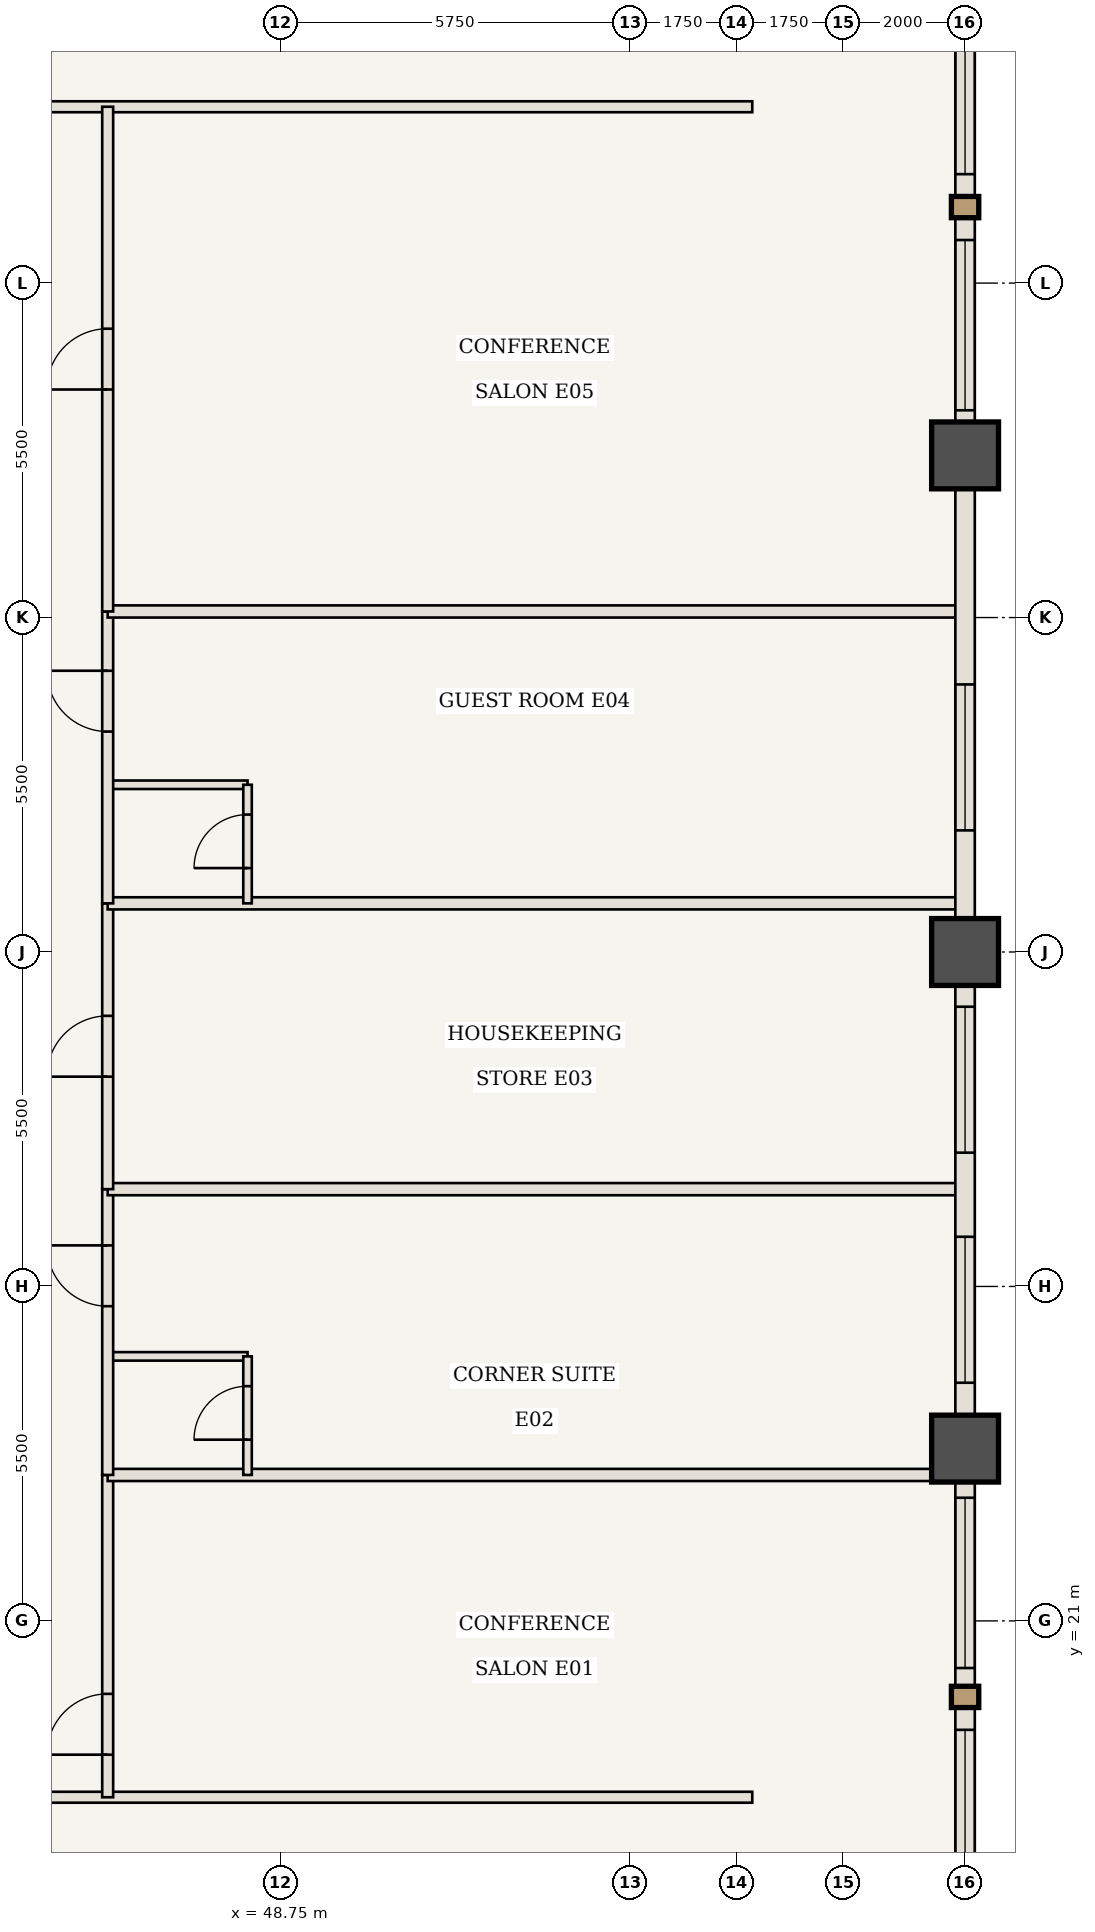
"""IFC4 building model, lengths in metres.
Left out: names, types, materials, properties, quantities, classifications, styles, units other than length and angle.
Written with IfcOpenShell. Run it as: python <this file> out.ifc"""

import sys

from ifc_helpers import new_model, si_unit, direction, frame, frame_2d, origin, origin_2d, place, context, subcontext, project, spatial, rectangle, extrude, element, fill, save


model = new_model("IFC4")
c1 = context("Model", 3, precision=1e-05, world=origin(), true_north=direction((0.0, 1.0)))
c2 = subcontext(c1, "Body", "Model", "MODEL_VIEW")
j1 = project(units=[si_unit("LENGTHUNIT", "METRE"), si_unit("PLANEANGLEUNIT", "RADIAN")], contexts=[c1])
p1 = place(None, origin())
s1 = spatial("IfcSite", under=j1, at=p1, CompositionType="ELEMENT")
p2 = place(p1, origin())
s2 = spatial("IfcBuilding", under=s1, at=p2, CompositionType="ELEMENT")
p3 = place(p2, frame((0.0, 0.0, 56.35)))
s3 = spatial("IfcBuildingStorey", under=s2, at=p3, CompositionType="ELEMENT", Elevation=56.35)
for number, where, z_axis, x_axis in (
    (1, (60.0, 23.833, 0.0), (0.0, 0.0, 1.0), (1.0, 0.0, 0.0)),
    (2, (60.0, 32.0, 0.0), (0.0, 0.0, 1.0), (1.0, 0.0, 0.0)),
    (3, (60.0, 40.167, 0.0), (0.0, 0.0, 1.0), (1.0, 0.0, 0.0)),
):
    element("IfcColumn", number, at=place(p3, frame(where, z_axis=z_axis, x_axis=x_axis)), inside=s3, PredefinedType="COLUMN", context=c2, shape_type="SweptSolid", body=[
        extrude(rectangle(XDim=1.1, YDim=1.1, at=origin_2d()), origin(), (0.0, 0.0, 1.0), 3.5),
    ])
p4 = place(p3, frame((34.5, 18.1, 0.0), z_axis=(0.0, 0.0, 1.0), x_axis=(1.0, 0.0, 0.0)))
e4 = element("IfcWall", 4, at=p4, inside=s3, PredefinedType="STANDARD", context=c2, shape_type="SweptSolid", body=[
    extrude(rectangle(XDim=22.0, YDim=0.18, at=frame_2d((11.0, 0.0))), origin(), (0.0, 0.0, 1.0), 3.32),
])
p5 = place(p4, frame((5.175, 0.0, 0.0)))
e5 = element("IfcOpeningElement", 5, at=p5, cuts=e4, PredefinedType="OPENING", context=c2, shape_type="SweptSolid", body=[
    extrude(rectangle(XDim=1.0, YDim=2.15, at=frame_2d((0.5, 1.075))), frame((0.0, 0.1, 0.0), z_axis=(0.0, -1.0, 0.0), x_axis=(1.0, 0.0, 0.0)), (0.0, 0.0, 1.0), 0.2),
])
p6 = place(p3, frame((38.0, 45.9, 0.0), z_axis=(0.0, 0.0, 1.0), x_axis=(1.0, 0.0, 0.0)))
e6 = element("IfcWall", 6, at=p6, inside=s3, PredefinedType="STANDARD", context=c2, shape_type="SweptSolid", body=[
    extrude(rectangle(XDim=18.5, YDim=0.18, at=frame_2d((9.25, 0.0))), origin(), (0.0, 0.0, 1.0), 3.32),
])
p7 = place(p6, frame((4.875, 0.0, 0.0)))
e7 = element("IfcOpeningElement", 7, at=p7, cuts=e6, PredefinedType="OPENING", context=c2, shape_type="SweptSolid", body=[
    extrude(rectangle(XDim=1.0, YDim=2.15, at=frame_2d((0.5, 1.075))), frame((0.0, 0.1, 0.0), z_axis=(0.0, -1.0, 0.0), x_axis=(1.0, 0.0, 0.0)), (0.0, 0.0, 1.0), 0.2),
])
p8 = place(p3, frame((45.9, 18.1, 0.0), z_axis=(0.0, 0.0, 1.0), x_axis=(0.0, 1.0, 0.0)))
e8 = element("IfcWall", 8, at=p8, inside=s3, PredefinedType="STANDARD", context=c2, shape_type="SweptSolid", body=[
    extrude(rectangle(XDim=5.3, YDim=0.18, at=frame_2d((2.65, 0.0))), origin(), (0.0, 0.0, 1.0), 3.32),
])
p9 = place(p8, frame((0.7, 0.0, 0.0)))
e9 = element("IfcOpeningElement", 9, at=p9, cuts=e8, PredefinedType="OPENING", context=c2, shape_type="SweptSolid", body=[
    extrude(rectangle(XDim=1.0, YDim=2.15, at=frame_2d((0.5, 1.075))), frame((0.0, 0.1, 0.0), z_axis=(0.0, -1.0, 0.0), x_axis=(1.0, 0.0, 0.0)), (0.0, 0.0, 1.0), 0.2),
])
p10 = place(p3, frame((45.9, 23.4, 0.0), z_axis=(0.0, 0.0, 1.0), x_axis=(1.0, 0.0, 0.0)))
e10 = element("IfcWall", 10, at=p10, inside=s3, PredefinedType="STANDARD", context=c2, shape_type="SweptSolid", body=[
    extrude(rectangle(XDim=14.04, YDim=0.2, at=frame_2d((7.02, 0.0))), origin(), (0.0, 0.0, 1.0), 3.32),
])
p11 = place(p3, frame((45.9, 25.35, 0.0), z_axis=(0.0, 0.0, 1.0), x_axis=(1.0, 0.0, 0.0)))
e11 = element("IfcWall", 11, at=p11, inside=s3, PredefinedType="STANDARD", context=c2, shape_type="SweptSolid", body=[
    extrude(rectangle(XDim=2.3, YDim=0.14, at=frame_2d((1.15, 0.0))), origin(), (0.0, 0.0, 1.0), 3.32),
])
p12 = place(p3, frame((48.2, 23.4, 0.0), z_axis=(0.0, 0.0, 1.0), x_axis=(0.0, 1.0, 0.0)))
e12 = element("IfcWall", 12, at=p12, inside=s3, PredefinedType="STANDARD", context=c2, shape_type="SweptSolid", body=[
    extrude(rectangle(XDim=1.95, YDim=0.14, at=frame_2d((0.975, 0.0))), origin(), (0.0, 0.0, 1.0), 3.32),
])
p13 = place(p12, frame((0.58, 0.0, 0.0)))
e13 = element("IfcOpeningElement", 13, at=p13, cuts=e12, PredefinedType="OPENING", context=c2, shape_type="SweptSolid", body=[
    extrude(rectangle(XDim=0.88, YDim=2.1, at=frame_2d((0.44, 1.05))), frame((0.0, 0.08, 0.0), z_axis=(0.0, -1.0, 0.0), x_axis=(1.0, 0.0, 0.0)), (0.0, 0.0, 1.0), 0.16),
])
p14 = place(p3, frame((45.9, 23.4, 0.0), z_axis=(0.0, 0.0, 1.0), x_axis=(0.0, 1.0, 0.0)))
e14 = element("IfcWall", 14, at=p14, inside=s3, PredefinedType="STANDARD", context=c2, shape_type="SweptSolid", body=[
    extrude(rectangle(XDim=4.7, YDim=0.18, at=frame_2d((2.35, 0.0))), origin(), (0.0, 0.0, 1.0), 3.32),
])
p15 = place(p14, frame((2.775, 0.0, 0.0)))
e15 = element("IfcOpeningElement", 15, at=p15, cuts=e14, PredefinedType="OPENING", context=c2, shape_type="SweptSolid", body=[
    extrude(rectangle(XDim=1.0, YDim=2.15, at=frame_2d((0.5, 1.075))), frame((0.0, 0.1, 0.0), z_axis=(0.0, -1.0, 0.0), x_axis=(1.0, 0.0, 0.0)), (0.0, 0.0, 1.0), 0.2),
])
p16 = place(p3, frame((45.9, 28.1, 0.0), z_axis=(0.0, 0.0, 1.0), x_axis=(1.0, 0.0, 0.0)))
e16 = element("IfcWall", 16, at=p16, inside=s3, PredefinedType="STANDARD", context=c2, shape_type="SweptSolid", body=[
    extrude(rectangle(XDim=14.04, YDim=0.2, at=frame_2d((7.02, 0.0))), origin(), (0.0, 0.0, 1.0), 3.32),
])
p17 = place(p3, frame((45.9, 28.1, 0.0), z_axis=(0.0, 0.0, 1.0), x_axis=(0.0, 1.0, 0.0)))
e17 = element("IfcWall", 17, at=p17, inside=s3, PredefinedType="STANDARD", context=c2, shape_type="SweptSolid", body=[
    extrude(rectangle(XDim=4.7, YDim=0.18, at=frame_2d((2.35, 0.0))), origin(), (0.0, 0.0, 1.0), 3.32),
])
p18 = place(p17, frame((1.85, 0.0, 0.0)))
e18 = element("IfcOpeningElement", 18, at=p18, cuts=e17, PredefinedType="OPENING", context=c2, shape_type="SweptSolid", body=[
    extrude(rectangle(XDim=1.0, YDim=2.15, at=frame_2d((0.5, 1.075))), frame((0.0, 0.1, 0.0), z_axis=(0.0, -1.0, 0.0), x_axis=(1.0, 0.0, 0.0)), (0.0, 0.0, 1.0), 0.2),
])
p19 = place(p3, frame((45.9, 32.8, 0.0), z_axis=(0.0, 0.0, 1.0), x_axis=(1.0, 0.0, 0.0)))
e19 = element("IfcWall", 19, at=p19, inside=s3, PredefinedType="STANDARD", context=c2, shape_type="SweptSolid", body=[
    extrude(rectangle(XDim=14.04, YDim=0.2, at=frame_2d((7.02, 0.0))), origin(), (0.0, 0.0, 1.0), 3.32),
])
p20 = place(p3, frame((45.9, 34.75, 0.0), z_axis=(0.0, 0.0, 1.0), x_axis=(1.0, 0.0, 0.0)))
e20 = element("IfcWall", 20, at=p20, inside=s3, PredefinedType="STANDARD", context=c2, shape_type="SweptSolid", body=[
    extrude(rectangle(XDim=2.3, YDim=0.14, at=frame_2d((1.15, 0.0))), origin(), (0.0, 0.0, 1.0), 3.32),
])
p21 = place(p3, frame((48.2, 32.8, 0.0), z_axis=(0.0, 0.0, 1.0), x_axis=(0.0, 1.0, 0.0)))
e21 = element("IfcWall", 21, at=p21, inside=s3, PredefinedType="STANDARD", context=c2, shape_type="SweptSolid", body=[
    extrude(rectangle(XDim=1.95, YDim=0.14, at=frame_2d((0.975, 0.0))), origin(), (0.0, 0.0, 1.0), 3.32),
])
p22 = place(p21, frame((0.58, 0.0, 0.0)))
e22 = element("IfcOpeningElement", 22, at=p22, cuts=e21, PredefinedType="OPENING", context=c2, shape_type="SweptSolid", body=[
    extrude(rectangle(XDim=0.88, YDim=2.1, at=frame_2d((0.44, 1.05))), frame((0.0, 0.08, 0.0), z_axis=(0.0, -1.0, 0.0), x_axis=(1.0, 0.0, 0.0)), (0.0, 0.0, 1.0), 0.16),
])
p23 = place(p3, frame((45.9, 32.8, 0.0), z_axis=(0.0, 0.0, 1.0), x_axis=(0.0, 1.0, 0.0)))
e23 = element("IfcWall", 23, at=p23, inside=s3, PredefinedType="STANDARD", context=c2, shape_type="SweptSolid", body=[
    extrude(rectangle(XDim=4.8, YDim=0.18, at=frame_2d((2.4, 0.0))), origin(), (0.0, 0.0, 1.0), 3.32),
])
p24 = place(p23, frame((2.825, 0.0, 0.0)))
e24 = element("IfcOpeningElement", 24, at=p24, cuts=e23, PredefinedType="OPENING", context=c2, shape_type="SweptSolid", body=[
    extrude(rectangle(XDim=1.0, YDim=2.15, at=frame_2d((0.5, 1.075))), frame((0.0, 0.1, 0.0), z_axis=(0.0, -1.0, 0.0), x_axis=(1.0, 0.0, 0.0)), (0.0, 0.0, 1.0), 0.2),
])
p25 = place(p3, frame((45.9, 37.6, 0.0), z_axis=(0.0, 0.0, 1.0), x_axis=(1.0, 0.0, 0.0)))
e25 = element("IfcWall", 25, at=p25, inside=s3, PredefinedType="STANDARD", context=c2, shape_type="SweptSolid", body=[
    extrude(rectangle(XDim=14.04, YDim=0.2, at=frame_2d((7.02, 0.0))), origin(), (0.0, 0.0, 1.0), 3.32),
])
p26 = place(p3, frame((45.9, 37.6, 0.0), z_axis=(0.0, 0.0, 1.0), x_axis=(0.0, 1.0, 0.0)))
e26 = element("IfcWall", 26, at=p26, inside=s3, PredefinedType="STANDARD", context=c2, shape_type="SweptSolid", body=[
    extrude(rectangle(XDim=8.3, YDim=0.18, at=frame_2d((4.15, 0.0))), origin(), (0.0, 0.0, 1.0), 3.32),
])
p27 = place(p26, frame((3.65, 0.0, 0.0)))
e27 = element("IfcOpeningElement", 27, at=p27, cuts=e26, PredefinedType="OPENING", context=c2, shape_type="SweptSolid", body=[
    extrude(rectangle(XDim=1.0, YDim=2.15, at=frame_2d((0.5, 1.075))), frame((0.0, 0.1, 0.0), z_axis=(0.0, -1.0, 0.0), x_axis=(1.0, 0.0, 0.0)), (0.0, 0.0, 1.0), 0.2),
])
p28 = place(p3, frame((60.0, 23.833, 0.0), z_axis=(0.0, 0.0, 1.0), x_axis=(0.0, -1.0, 0.0)))
e28 = element("IfcWall", 28, at=p28, inside=s3, PredefinedType="USERDEFINED", context=c2, shape_type="SweptSolid", body=[
    extrude(rectangle(XDim=8.167, YDim=0.32, at=frame_2d((4.083, 0.0))), origin(), (0.0, 0.0, 1.0), 2.52),
])
p29 = place(p28, frame((0.808, 0.0, 0.85)))
e29 = element("IfcOpeningElement", 29, at=p29, cuts=e28, PredefinedType="OPENING", context=c2, shape_type="SweptSolid", body=[
    extrude(rectangle(XDim=2.8, YDim=1.47, at=frame_2d((1.4, 0.735))), frame((0.0, 0.17, 0.0), z_axis=(0.0, -1.0, 0.0), x_axis=(1.0, 0.0, 0.0)), (0.0, 0.0, 1.0), 0.34),
])
p30 = place(p28, frame((4.625, 0.0, 0.85)))
e30 = element("IfcOpeningElement", 30, at=p30, cuts=e28, PredefinedType="OPENING", context=c2, shape_type="SweptSolid", body=[
    extrude(rectangle(XDim=2.8, YDim=1.47, at=frame_2d((1.4, 0.735))), frame((0.0, 0.17, 0.0), z_axis=(0.0, -1.0, 0.0), x_axis=(1.0, 0.0, 0.0)), (0.0, 0.0, 1.0), 0.34),
])
p31 = place(p3, frame((60.0, 32.0, 0.0), z_axis=(0.0, 0.0, 1.0), x_axis=(0.0, -1.0, 0.0)))
e31 = element("IfcWall", 31, at=p31, inside=s3, PredefinedType="USERDEFINED", context=c2, shape_type="SweptSolid", body=[
    extrude(rectangle(XDim=8.167, YDim=0.32, at=frame_2d((4.083, 0.0))), origin(), (0.0, 0.0, 1.0), 2.52),
])
p32 = place(p31, frame((0.9, 0.0, 0.85)))
e32 = element("IfcOpeningElement", 32, at=p32, cuts=e31, PredefinedType="OPENING", context=c2, shape_type="SweptSolid", body=[
    extrude(rectangle(XDim=2.4, YDim=1.47, at=frame_2d((1.2, 0.735))), frame((0.0, 0.17, 0.0), z_axis=(0.0, -1.0, 0.0), x_axis=(1.0, 0.0, 0.0)), (0.0, 0.0, 1.0), 0.34),
])
p33 = place(p31, frame((4.683, 0.0, 0.85)))
e33 = element("IfcOpeningElement", 33, at=p33, cuts=e31, PredefinedType="OPENING", context=c2, shape_type="SweptSolid", body=[
    extrude(rectangle(XDim=2.4, YDim=1.47, at=frame_2d((1.2, 0.735))), frame((0.0, 0.17, 0.0), z_axis=(0.0, -1.0, 0.0), x_axis=(1.0, 0.0, 0.0)), (0.0, 0.0, 1.0), 0.34),
])
p34 = place(p3, frame((60.0, 40.167, 0.0), z_axis=(0.0, 0.0, 1.0), x_axis=(0.0, -1.0, 0.0)))
e34 = element("IfcWall", 34, at=p34, inside=s3, PredefinedType="USERDEFINED", context=c2, shape_type="SweptSolid", body=[
    extrude(rectangle(XDim=8.167, YDim=0.32, at=frame_2d((4.083, 0.0))), origin(), (0.0, 0.0, 1.0), 2.52),
])
p35 = place(p34, frame((3.767, 0.0, 0.85)))
e35 = element("IfcOpeningElement", 35, at=p35, cuts=e34, PredefinedType="OPENING", context=c2, shape_type="SweptSolid", body=[
    extrude(rectangle(XDim=2.4, YDim=1.47, at=frame_2d((1.2, 0.735))), frame((0.0, 0.17, 0.0), z_axis=(0.0, -1.0, 0.0), x_axis=(1.0, 0.0, 0.0)), (0.0, 0.0, 1.0), 0.34),
])
p36 = place(p3, frame((60.0, 48.333, 0.0), z_axis=(0.0, 0.0, 1.0), x_axis=(0.0, -1.0, 0.0)))
e36 = element("IfcWall", 36, at=p36, inside=s3, PredefinedType="USERDEFINED", context=c2, shape_type="SweptSolid", body=[
    extrude(rectangle(XDim=8.167, YDim=0.32, at=frame_2d((4.083, 0.0))), origin(), (0.0, 0.0, 1.0), 2.52),
])
p37 = place(p36, frame((0.742, 0.0, 0.85)))
e37 = element("IfcOpeningElement", 37, at=p37, cuts=e36, PredefinedType="OPENING", context=c2, shape_type="SweptSolid", body=[
    extrude(rectangle(XDim=2.8, YDim=1.47, at=frame_2d((1.4, 0.735))), frame((0.0, 0.17, 0.0), z_axis=(0.0, -1.0, 0.0), x_axis=(1.0, 0.0, 0.0)), (0.0, 0.0, 1.0), 0.34),
])
p38 = place(p36, frame((4.625, 0.0, 0.85)))
e38 = element("IfcOpeningElement", 38, at=p38, cuts=e36, PredefinedType="OPENING", context=c2, shape_type="SweptSolid", body=[
    extrude(rectangle(XDim=2.8, YDim=1.47, at=frame_2d((1.4, 0.735))), frame((0.0, 0.17, 0.0), z_axis=(0.0, -1.0, 0.0), x_axis=(1.0, 0.0, 0.0)), (0.0, 0.0, 1.0), 0.34),
])
p39 = place(p9, origin())
e39 = element("IfcDoor", 39, at=p39, inside=s3, OperationType="SINGLE_SWING_LEFT", PredefinedType="DOOR", context=c2, shape_type="SweptSolid", body=[
    extrude(rectangle(XDim=1.0, YDim=2.15, at=frame_2d((0.5, 1.075))), frame((0.0, 0.025, 0.0), z_axis=(0.0, -1.0, 0.0), x_axis=(1.0, 0.0, 0.0)), (0.0, 0.0, 1.0), 0.05),
])
fill(e9, e39)
p40 = place(p13, origin())
e40 = element("IfcDoor", 40, at=p40, inside=s3, OperationType="SINGLE_SWING_LEFT", PredefinedType="DOOR", context=c2, shape_type="SweptSolid", body=[
    extrude(rectangle(XDim=0.88, YDim=2.1, at=frame_2d((0.44, 1.05))), frame((0.0, 0.025, 0.0), z_axis=(0.0, -1.0, 0.0), x_axis=(1.0, 0.0, 0.0)), (0.0, 0.0, 1.0), 0.05),
])
fill(e13, e40)
p41 = place(p15, origin())
e41 = element("IfcDoor", 41, at=p41, inside=s3, OperationType="SINGLE_SWING_RIGHT", PredefinedType="DOOR", context=c2, shape_type="SweptSolid", body=[
    extrude(rectangle(XDim=1.0, YDim=2.15, at=frame_2d((0.5, 1.075))), frame((0.0, 0.025, 0.0), z_axis=(0.0, -1.0, 0.0), x_axis=(1.0, 0.0, 0.0)), (0.0, 0.0, 1.0), 0.05),
])
fill(e15, e41)
p42 = place(p18, origin())
e42 = element("IfcDoor", 42, at=p42, inside=s3, OperationType="SINGLE_SWING_LEFT", PredefinedType="DOOR", context=c2, shape_type="SweptSolid", body=[
    extrude(rectangle(XDim=1.0, YDim=2.15, at=frame_2d((0.5, 1.075))), frame((0.0, 0.025, 0.0), z_axis=(0.0, -1.0, 0.0), x_axis=(1.0, 0.0, 0.0)), (0.0, 0.0, 1.0), 0.05),
])
fill(e18, e42)
p43 = place(p22, origin())
e43 = element("IfcDoor", 43, at=p43, inside=s3, OperationType="SINGLE_SWING_LEFT", PredefinedType="DOOR", context=c2, shape_type="SweptSolid", body=[
    extrude(rectangle(XDim=0.88, YDim=2.1, at=frame_2d((0.44, 1.05))), frame((0.0, 0.025, 0.0), z_axis=(0.0, -1.0, 0.0), x_axis=(1.0, 0.0, 0.0)), (0.0, 0.0, 1.0), 0.05),
])
fill(e22, e43)
p44 = place(p24, origin())
e44 = element("IfcDoor", 44, at=p44, inside=s3, OperationType="SINGLE_SWING_RIGHT", PredefinedType="DOOR", context=c2, shape_type="SweptSolid", body=[
    extrude(rectangle(XDim=1.0, YDim=2.15, at=frame_2d((0.5, 1.075))), frame((0.0, 0.025, 0.0), z_axis=(0.0, -1.0, 0.0), x_axis=(1.0, 0.0, 0.0)), (0.0, 0.0, 1.0), 0.05),
])
fill(e24, e44)
p45 = place(p27, origin())
e45 = element("IfcDoor", 45, at=p45, inside=s3, OperationType="SINGLE_SWING_LEFT", PredefinedType="DOOR", context=c2, shape_type="SweptSolid", body=[
    extrude(rectangle(XDim=1.0, YDim=2.15, at=frame_2d((0.5, 1.075))), frame((0.0, 0.025, 0.0), z_axis=(0.0, -1.0, 0.0), x_axis=(1.0, 0.0, 0.0)), (0.0, 0.0, 1.0), 0.05),
])
fill(e27, e45)
p46 = place(p29, origin())
e46 = element("IfcWindow", 46, at=p46, inside=s3, PartitioningType="SINGLE_PANEL", PredefinedType="WINDOW", context=c2, shape_type="SweptSolid", body=[
    extrude(rectangle(XDim=2.8, YDim=1.47, at=frame_2d((1.4, 0.735))), frame((0.0, 0.03, 0.0), z_axis=(0.0, -1.0, 0.0), x_axis=(1.0, 0.0, 0.0)), (0.0, 0.0, 1.0), 0.06),
])
fill(e29, e46)
p47 = place(p30, origin())
e47 = element("IfcWindow", 47, at=p47, inside=s3, PartitioningType="SINGLE_PANEL", PredefinedType="WINDOW", context=c2, shape_type="SweptSolid", body=[
    extrude(rectangle(XDim=2.8, YDim=1.47, at=frame_2d((1.4, 0.735))), frame((0.0, 0.03, 0.0), z_axis=(0.0, -1.0, 0.0), x_axis=(1.0, 0.0, 0.0)), (0.0, 0.0, 1.0), 0.06),
])
fill(e30, e47)
p48 = place(p32, origin())
e48 = element("IfcWindow", 48, at=p48, inside=s3, PartitioningType="SINGLE_PANEL", PredefinedType="WINDOW", context=c2, shape_type="SweptSolid", body=[
    extrude(rectangle(XDim=2.4, YDim=1.47, at=frame_2d((1.2, 0.735))), frame((0.0, 0.03, 0.0), z_axis=(0.0, -1.0, 0.0), x_axis=(1.0, 0.0, 0.0)), (0.0, 0.0, 1.0), 0.06),
])
fill(e32, e48)
p49 = place(p33, origin())
e49 = element("IfcWindow", 49, at=p49, inside=s3, PartitioningType="SINGLE_PANEL", PredefinedType="WINDOW", context=c2, shape_type="SweptSolid", body=[
    extrude(rectangle(XDim=2.4, YDim=1.47, at=frame_2d((1.2, 0.735))), frame((0.0, 0.03, 0.0), z_axis=(0.0, -1.0, 0.0), x_axis=(1.0, 0.0, 0.0)), (0.0, 0.0, 1.0), 0.06),
])
fill(e33, e49)
p50 = place(p35, origin())
e50 = element("IfcWindow", 50, at=p50, inside=s3, PartitioningType="SINGLE_PANEL", PredefinedType="WINDOW", context=c2, shape_type="SweptSolid", body=[
    extrude(rectangle(XDim=2.4, YDim=1.47, at=frame_2d((1.2, 0.735))), frame((0.0, 0.03, 0.0), z_axis=(0.0, -1.0, 0.0), x_axis=(1.0, 0.0, 0.0)), (0.0, 0.0, 1.0), 0.06),
])
fill(e35, e50)
p51 = place(p37, origin())
e51 = element("IfcWindow", 51, at=p51, inside=s3, PartitioningType="SINGLE_PANEL", PredefinedType="WINDOW", context=c2, shape_type="SweptSolid", body=[
    extrude(rectangle(XDim=2.8, YDim=1.47, at=frame_2d((1.4, 0.735))), frame((0.0, 0.03, 0.0), z_axis=(0.0, -1.0, 0.0), x_axis=(1.0, 0.0, 0.0)), (0.0, 0.0, 1.0), 0.06),
])
fill(e37, e51)
p52 = place(p38, origin())
e52 = element("IfcWindow", 52, at=p52, inside=s3, PartitioningType="SINGLE_PANEL", PredefinedType="WINDOW", context=c2, shape_type="SweptSolid", body=[
    extrude(rectangle(XDim=2.8, YDim=1.47, at=frame_2d((1.4, 0.735))), frame((0.0, 0.03, 0.0), z_axis=(0.0, -1.0, 0.0), x_axis=(1.0, 0.0, 0.0)), (0.0, 0.0, 1.0), 0.06),
])
fill(e38, e52)
save(model, sys.argv[1])
